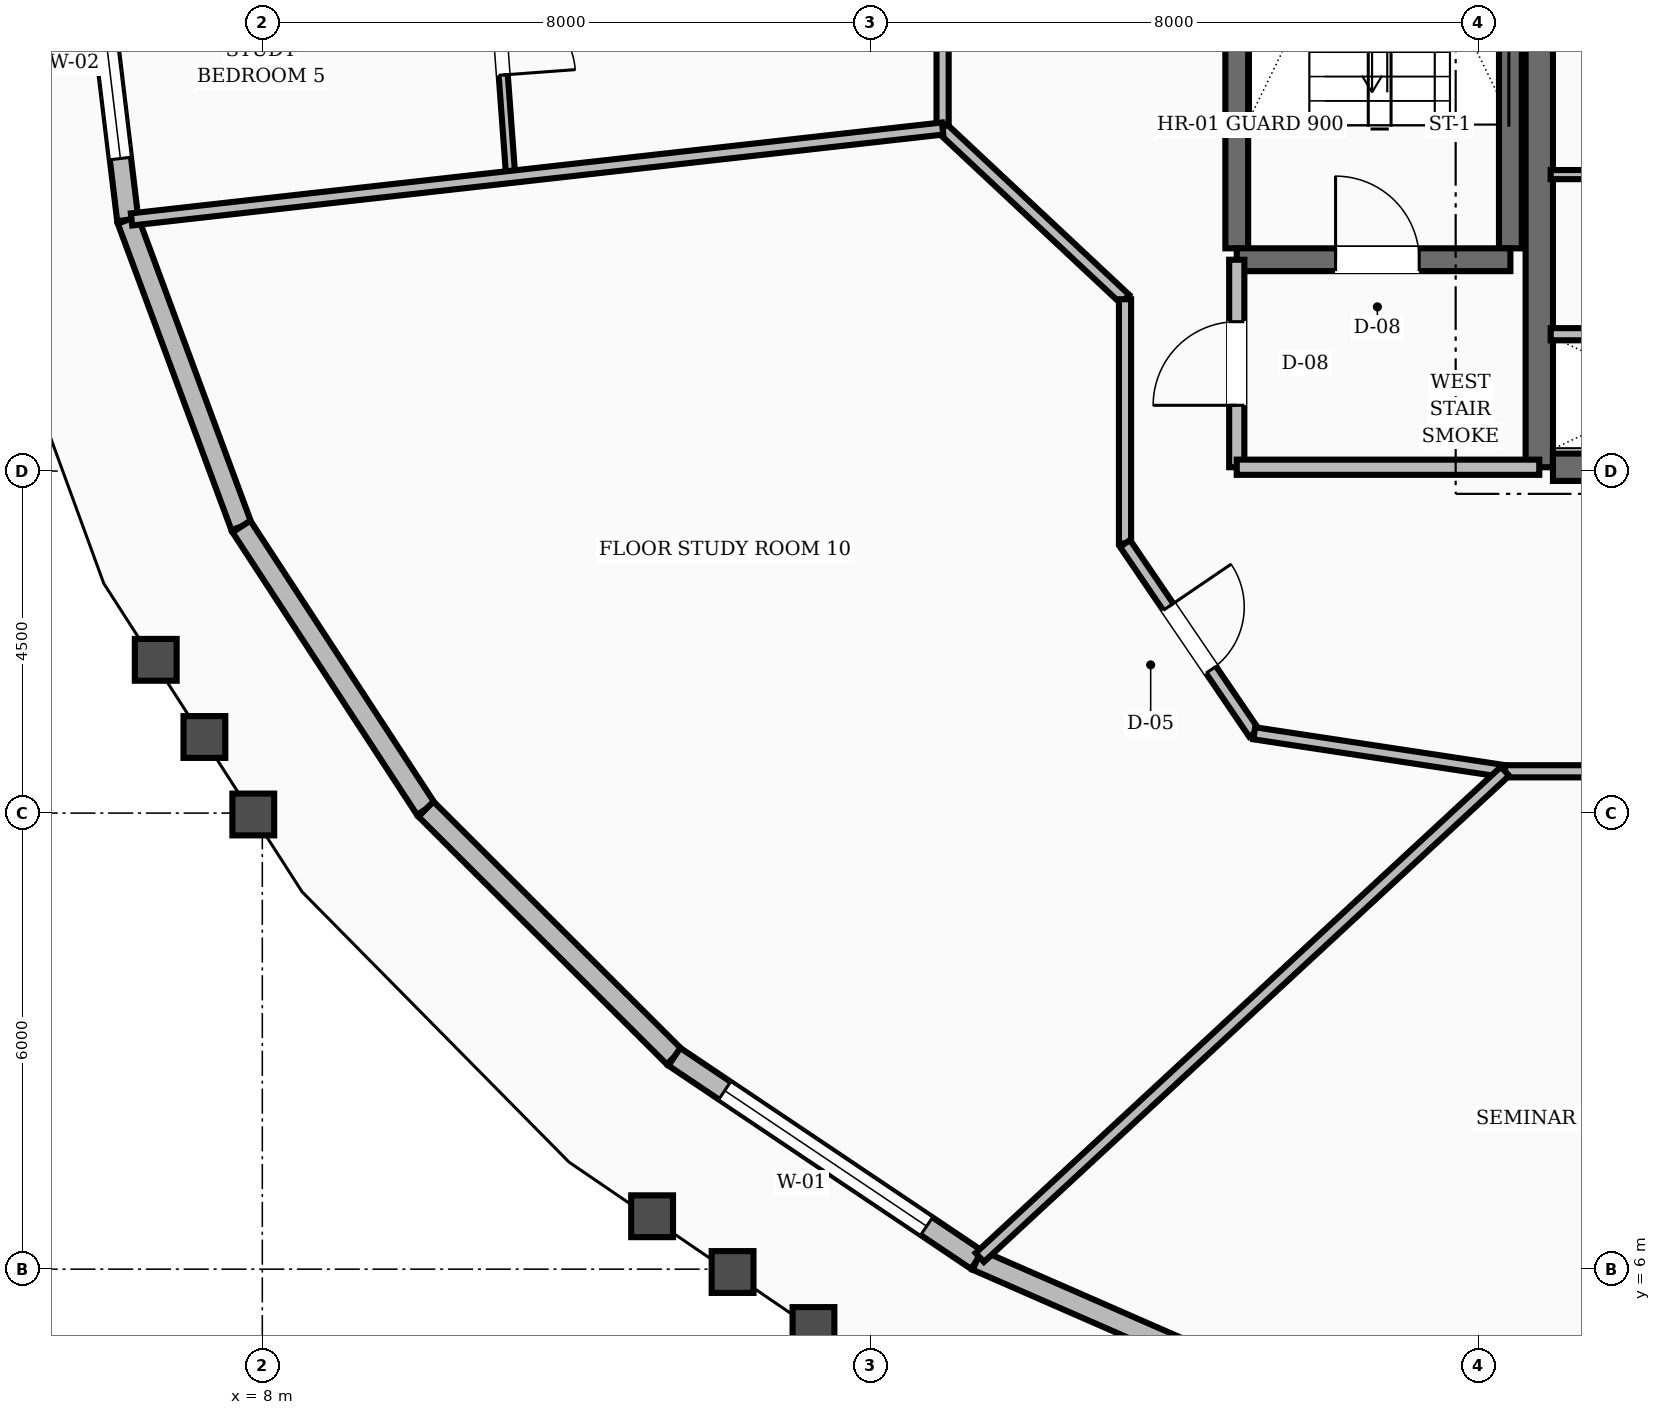
"""IFC4 building model, lengths in metres.
Left out: names, types, materials, properties, quantities, classifications, styles, units other than length and angle.
Written with IfcOpenShell. Run it as: python <this file> out.ifc"""

import sys

from ifc_helpers import new_model, si_unit, direction, frame, frame_2d, origin, place, context, subcontext, project, spatial, rectangle, extrude, element, fill, save


model = new_model("IFC4")
c1 = context("Model", 3, precision=1e-05, world=origin(), true_north=direction((0.0, 1.0)))
c2 = subcontext(c1, "Body", "Model", "MODEL_VIEW")
j1 = project(units=[si_unit("LENGTHUNIT", "METRE"), si_unit("PLANEANGLEUNIT", "RADIAN")], contexts=[c1])
p1 = place(None, origin())
s1 = spatial("IfcSite", under=j1, at=p1, CompositionType="ELEMENT")
p2 = place(p1, origin())
s2 = spatial("IfcBuilding", under=s1, at=p2, CompositionType="ELEMENT")
p3 = place(p2, frame((0.0, 0.0, 156.8)))
s3 = spatial("IfcBuildingStorey", under=s2, at=p3, CompositionType="ELEMENT", Elevation=156.8)
p4 = place(p3, frame((24.8, 16.55, 0.0), z_axis=(0.0, 0.0, 1.0), x_axis=(0.0, 1.0, 0.0)))
e1 = element("IfcWall", 1, at=p4, inside=s3, PredefinedType="SHEAR", context=c2, shape_type="SweptSolid", body=[
    extrude(rectangle(XDim=6.3, YDim=0.36, at=frame_2d((3.15, 0.0))), origin(), (0.0, 0.0, 1.0), 3.6),
])
p5 = place(p3, frame((24.98, 16.55, 0.0), z_axis=(0.0, 0.0, 1.0), x_axis=(1.0, 0.0, 0.0)))
e2 = element("IfcWall", 2, at=p5, inside=s3, PredefinedType="SHEAR", context=c2, shape_type="SweptSolid", body=[
    extrude(rectangle(XDim=3.22, YDim=0.36, at=frame_2d((1.61, 0.0))), origin(), (0.0, 0.0, 1.0), 3.6),
])
for number, where, z_axis, x_axis in (
    (3, (20.82, 19.43, 0.0), (0.0, 0.0, 1.0), (0.0, 1.0, 0.0)),
    (4, (24.42, 19.43, 0.0), (0.0, 0.0, 1.0), (0.0, 1.0, 0.0)),
):
    element("IfcWall", number, at=place(p3, frame(where, z_axis=z_axis, x_axis=x_axis)), inside=s3, PredefinedType="SHEAR", context=c2, shape_type="SweptSolid", body=[
        extrude(rectangle(XDim=8.74, YDim=0.3, at=frame_2d((4.37, 0.0))), origin(), (0.0, 0.0, 1.0), 3.6),
    ])
p6 = place(p3, frame((20.82, 19.28, 0.0), z_axis=(0.0, 0.0, 1.0), x_axis=(1.0, 0.0, 0.0)))
e5 = element("IfcWall", 5, at=p6, inside=s3, PredefinedType="SHEAR", context=c2, shape_type="SweptSolid", body=[
    extrude(rectangle(XDim=3.6, YDim=0.3, at=frame_2d((1.8, 0.0))), origin(), (0.0, 0.0, 1.0), 3.6),
])
p7 = place(p6, frame((1.3, 0.0, 0.0)))
e6 = element("IfcOpeningElement", 6, at=p7, cuts=e5, PredefinedType="OPENING", context=c2, shape_type="SweptSolid", body=[
    extrude(rectangle(XDim=1.1, YDim=2.1, at=frame_2d((0.55, 1.05))), frame((0.0, 0.16, 0.0), z_axis=(0.0, -1.0, 0.0), x_axis=(1.0, 0.0, 0.0)), (0.0, 0.0, 1.0), 0.32),
])
p8 = place(p3, frame((5.725, 24.0, 0.0), z_axis=(0.0, 0.0, 1.0), x_axis=(0.119482396894, -0.992836319255, 0.0)))
e7 = element("IfcWall", 7, at=p8, inside=s3, PredefinedType="STANDARD", context=c2, shape_type="SweptSolid", body=[
    extrude(rectangle(XDim=4.226, YDim=0.28, at=frame_2d((2.113, 0.0))), origin(), (0.0, 0.0, 1.0), 2.82),
])
p9 = place(p8, frame((0.813, 0.0, 0.8)))
e8 = element("IfcOpeningElement", 8, at=p9, cuts=e7, PredefinedType="OPENING", context=c2, shape_type="SweptSolid", body=[
    extrude(rectangle(XDim=2.6, YDim=1.65, at=frame_2d((1.3, 0.825))), frame((0.0, 0.15, 0.0), z_axis=(0.0, -1.0, 0.0), x_axis=(1.0, 0.0, 0.0)), (0.0, 0.0, 1.0), 0.3),
])
p10 = place(p3, frame((6.23, 19.805, 0.0), z_axis=(0.0, 0.0, 1.0), x_axis=(0.347513952329, -0.937674811935, 0.0)))
e9 = element("IfcWall", 9, at=p10, inside=s3, PredefinedType="STANDARD", context=c2, shape_type="SweptSolid", body=[
    extrude(rectangle(XDim=4.302, YDim=0.28, at=frame_2d((2.151, 0.0))), origin(), (0.0, 0.0, 1.0), 2.82),
])
p11 = place(p3, frame((7.725, 15.771, 0.0), z_axis=(0.0, 0.0, 1.0), x_axis=(0.546834521775, -0.83724070959, 0.0)))
e10 = element("IfcWall", 10, at=p11, inside=s3, PredefinedType="STANDARD", context=c2, shape_type="SweptSolid", body=[
    extrude(rectangle(XDim=4.44, YDim=0.28, at=frame_2d((2.22, 0.0))), origin(), (0.0, 0.0, 1.0), 2.82),
])
p12 = place(p3, frame((10.153, 12.053, 0.0), z_axis=(0.0, 0.0, 1.0), x_axis=(0.708084852303, -0.706127355326, 0.0)))
e11 = element("IfcWall", 11, at=p12, inside=s3, PredefinedType="STANDARD", context=c2, shape_type="SweptSolid", body=[
    extrude(rectangle(XDim=4.615, YDim=0.28, at=frame_2d((2.307, 0.0))), origin(), (0.0, 0.0, 1.0), 2.82),
])
p13 = place(p3, frame((13.421, 8.794, 0.0), z_axis=(0.0, 0.0, 1.0), x_axis=(0.830095249601, -0.557621624931, 0.0)))
e12 = element("IfcWall", 12, at=p13, inside=s3, PredefinedType="STANDARD", context=c2, shape_type="SweptSolid", body=[
    extrude(rectangle(XDim=4.796, YDim=0.28, at=frame_2d((2.398, 0.0))), origin(), (0.0, 0.0, 1.0), 2.82),
])
p14 = place(p13, frame((0.798, 0.0, 0.8)))
e13 = element("IfcOpeningElement", 13, at=p14, cuts=e12, PredefinedType="OPENING", context=c2, shape_type="SweptSolid", body=[
    extrude(rectangle(XDim=3.2, YDim=1.65, at=frame_2d((1.6, 0.825))), frame((0.0, 0.15, 0.0), z_axis=(0.0, -1.0, 0.0), x_axis=(1.0, 0.0, 0.0)), (0.0, 0.0, 1.0), 0.3),
])
p15 = place(p3, frame((17.402, 6.12, 0.0), z_axis=(0.0, 0.0, 1.0), x_axis=(0.916185584373, -0.400754257603, 0.0)))
e14 = element("IfcWall", 14, at=p15, inside=s3, PredefinedType="STANDARD", context=c2, shape_type="SweptSolid", body=[
    extrude(rectangle(XDim=4.958, YDim=0.28, at=frame_2d((2.479, 0.0))), origin(), (0.0, 0.0, 1.0), 2.82),
])
p16 = place(p3, frame((20.82, 16.55, 0.0), z_axis=(0.0, 0.0, 1.0), x_axis=(0.0, 1.0, 0.0)))
e15 = element("IfcWall", 15, at=p16, inside=s3, PredefinedType="SOLIDWALL", context=c2, shape_type="SweptSolid", body=[
    extrude(rectangle(XDim=2.73, YDim=0.2, at=frame_2d((1.365, 0.0))), origin(), (0.0, 0.0, 1.0), 2.8),
])
p17 = place(p16, frame((0.815, 0.0, 0.0)))
e16 = element("IfcOpeningElement", 16, at=p17, cuts=e15, PredefinedType="OPENING", context=c2, shape_type="SweptSolid", body=[
    extrude(rectangle(XDim=1.1, YDim=2.1, at=frame_2d((0.55, 1.05))), frame((0.0, 0.11, 0.0), z_axis=(0.0, -1.0, 0.0), x_axis=(1.0, 0.0, 0.0)), (0.0, 0.0, 1.0), 0.22),
])
p18 = place(p3, frame((20.82, 16.55, 0.0), z_axis=(0.0, 0.0, 1.0), x_axis=(1.0, 0.0, 0.0)))
e17 = element("IfcWall", 17, at=p18, inside=s3, PredefinedType="SOLIDWALL", context=c2, shape_type="SweptSolid", body=[
    extrude(rectangle(XDim=3.98, YDim=0.2, at=frame_2d((1.99, 0.0))), origin(), (0.0, 0.0, 1.0), 2.8),
])
p19 = place(p3, frame((24.95, 18.3, 0.0), z_axis=(0.0, 0.0, 1.0), x_axis=(1.0, 0.0, 0.0)))
e18 = element("IfcWall", 18, at=p19, inside=s3, PredefinedType="SOLIDWALL", context=c2, shape_type="SweptSolid", body=[
    extrude(rectangle(XDim=3.2, YDim=0.16, at=frame_2d((1.6, 0.0))), origin(), (0.0, 0.0, 1.0), 2.8),
])
p20 = place(p3, frame((24.95, 20.4, 0.0), z_axis=(0.0, 0.0, 1.0), x_axis=(1.0, 0.0, 0.0)))
e19 = element("IfcWall", 19, at=p20, inside=s3, PredefinedType="PARTITIONING", context=c2, shape_type="SweptSolid", body=[
    extrude(rectangle(XDim=3.2, YDim=0.12, at=frame_2d((1.6, 0.0))), origin(), (0.0, 0.0, 1.0), 2.8),
])
p21 = place(p20, frame((1.125, 0.0, 0.0)))
e20 = element("IfcOpeningElement", 20, at=p21, cuts=e19, PredefinedType="OPENING", context=c2, shape_type="SweptSolid", body=[
    extrude(rectangle(XDim=0.95, YDim=2.1, at=frame_2d((0.475, 1.05))), frame((0.0, 0.07, 0.0), z_axis=(0.0, -1.0, 0.0), x_axis=(1.0, 0.0, 0.0)), (0.0, 0.0, 1.0), 0.14),
])
p22 = place(p3, frame((16.95, 24.0, 0.0), z_axis=(0.0, 0.0, 1.0), x_axis=(0.0, -1.0, 0.0)))
e21 = element("IfcWall", 21, at=p22, inside=s3, PredefinedType="SOLIDWALL", context=c2, shape_type="SweptSolid", body=[
    extrude(rectangle(XDim=2.994, YDim=0.16, at=frame_2d((1.497, 0.0))), origin(), (0.0, 0.0, 1.0), 2.8),
])
p23 = place(p3, frame((16.95, 21.006, 0.0), z_axis=(0.0, 0.0, 1.0), x_axis=(0.730150682073, -0.683286163674, 0.0)))
e22 = element("IfcWall", 22, at=p23, inside=s3, PredefinedType="SOLIDWALL", context=c2, shape_type="SweptSolid", body=[
    extrude(rectangle(XDim=3.287, YDim=0.16, at=frame_2d((1.644, 0.0))), origin(), (0.0, 0.0, 1.0), 2.8),
])
p24 = place(p3, frame((19.35, 18.76, 0.0), z_axis=(0.0, 0.0, 1.0), x_axis=(0.0, -1.0, 0.0)))
e23 = element("IfcWall", 23, at=p24, inside=s3, PredefinedType="SOLIDWALL", context=c2, shape_type="SweptSolid", body=[
    extrude(rectangle(XDim=3.213, YDim=0.16, at=frame_2d((1.606, 0.0))), origin(), (0.0, 0.0, 1.0), 2.8),
])
p25 = place(p3, frame((19.35, 15.548, 0.0), z_axis=(0.0, 0.0, 1.0), x_axis=(0.562674669208, -0.826678423955, 0.0)))
e24 = element("IfcWall", 24, at=p25, inside=s3, PredefinedType="SOLIDWALL", context=c2, shape_type="SweptSolid", body=[
    extrude(rectangle(XDim=3.021, YDim=0.16, at=frame_2d((1.511, 0.0))), origin(), (0.0, 0.0, 1.0), 2.8),
])
p26 = place(p25, frame((1.01, 0.0, 0.0)))
e25 = element("IfcOpeningElement", 25, at=p26, cuts=e24, PredefinedType="OPENING", context=c2, shape_type="SweptSolid", body=[
    extrude(rectangle(XDim=1.0, YDim=2.1, at=frame_2d((0.5, 1.05))), frame((0.0, 0.09, 0.0), z_axis=(0.0, -1.0, 0.0), x_axis=(1.0, 0.0, 0.0)), (0.0, 0.0, 1.0), 0.18),
])
p27 = place(p3, frame((21.05, 13.05, 0.0), z_axis=(0.0, 0.0, 1.0), x_axis=(0.988710906508, -0.149835721217, 0.0)))
e26 = element("IfcWall", 26, at=p27, inside=s3, PredefinedType="SOLIDWALL", context=c2, shape_type="SweptSolid", body=[
    extrude(rectangle(XDim=3.337, YDim=0.16, at=frame_2d((1.668, 0.0))), origin(), (0.0, 0.0, 1.0), 2.8),
])
p28 = place(p3, frame((24.349, 12.55, 0.0), z_axis=(0.0, 0.0, 1.0), x_axis=(1.0, 0.0, 0.0)))
e27 = element("IfcWall", 27, at=p28, inside=s3, PredefinedType="SOLIDWALL", context=c2, shape_type="SweptSolid", body=[
    extrude(rectangle(XDim=2.908, YDim=0.16, at=frame_2d((1.454, 0.0))), origin(), (0.0, 0.0, 1.0), 2.8),
])
p29 = place(p3, frame((11.001, 24.0, 0.0), z_axis=(0.0, 0.0, 1.0), x_axis=(0.073501140862, -0.997295132993, 0.0)))
e28 = element("IfcWall", 28, at=p29, inside=s3, PredefinedType="PARTITIONING", context=c2, shape_type="SweptSolid", body=[
    extrude(rectangle(XDim=3.64, YDim=0.12, at=frame_2d((1.82, 0.0))), origin(), (0.0, 0.0, 1.0), 2.8),
])
p30 = place(p29, frame((1.345, 0.0, 0.0)))
e29 = element("IfcOpeningElement", 29, at=p30, cuts=e28, PredefinedType="OPENING", context=c2, shape_type="SweptSolid", body=[
    extrude(rectangle(XDim=0.95, YDim=2.1, at=frame_2d((0.475, 1.05))), frame((0.0, 0.07, 0.0), z_axis=(0.0, -1.0, 0.0), x_axis=(1.0, 0.0, 0.0)), (0.0, 0.0, 1.0), 0.14),
])
p31 = place(p3, frame((16.95, 21.006, 0.0), z_axis=(0.0, 0.0, 1.0), x_axis=(-0.993776231557, -0.111394800558, 0.0)))
e30 = element("IfcWall", 30, at=p31, inside=s3, PredefinedType="SOLIDWALL", context=c2, shape_type="SweptSolid", body=[
    extrude(rectangle(XDim=10.737, YDim=0.16, at=frame_2d((5.369, 0.0))), origin(), (0.0, 0.0, 1.0), 2.8),
])
p32 = place(p3, frame((24.349, 12.55, 0.0), z_axis=(0.0, 0.0, 1.0), x_axis=(-0.733869336749, -0.679290656921, 0.0)))
e31 = element("IfcWall", 31, at=p32, inside=s3, PredefinedType="SOLIDWALL", context=c2, shape_type="SweptSolid", body=[
    extrude(rectangle(XDim=9.416, YDim=0.16, at=frame_2d((4.708, 0.0))), origin(), (0.0, 0.0, 1.0), 2.8),
])
p33 = place(p9, origin())
e32 = element("IfcWindow", 32, at=p33, inside=s3, PartitioningType="SINGLE_PANEL", PredefinedType="WINDOW", context=c2, shape_type="SweptSolid", body=[
    extrude(rectangle(XDim=2.6, YDim=1.65, at=frame_2d((1.3, 0.825))), frame((0.0, 0.03, 0.0), z_axis=(0.0, -1.0, 0.0), x_axis=(1.0, 0.0, 0.0)), (0.0, 0.0, 1.0), 0.06),
])
fill(e8, e32)
p34 = place(p14, origin())
e33 = element("IfcWindow", 33, at=p34, inside=s3, PartitioningType="SINGLE_PANEL", PredefinedType="WINDOW", context=c2, shape_type="SweptSolid", body=[
    extrude(rectangle(XDim=3.2, YDim=1.65, at=frame_2d((1.6, 0.825))), frame((0.0, 0.03, 0.0), z_axis=(0.0, -1.0, 0.0), x_axis=(1.0, 0.0, 0.0)), (0.0, 0.0, 1.0), 0.06),
])
fill(e13, e33)
p35 = place(p7, origin())
e34 = element("IfcDoor", 34, at=p35, inside=s3, OperationType="SINGLE_SWING_LEFT", PredefinedType="DOOR", context=c2, shape_type="SweptSolid", body=[
    extrude(rectangle(XDim=1.1, YDim=2.1, at=frame_2d((0.55, 1.05))), frame((0.0, 0.025, 0.0), z_axis=(0.0, -1.0, 0.0), x_axis=(1.0, 0.0, 0.0)), (0.0, 0.0, 1.0), 0.05),
])
fill(e6, e34)
p36 = place(p17, origin())
e35 = element("IfcDoor", 35, at=p36, inside=s3, OperationType="SINGLE_SWING_LEFT", PredefinedType="DOOR", context=c2, shape_type="SweptSolid", body=[
    extrude(rectangle(XDim=1.1, YDim=2.1, at=frame_2d((0.55, 1.05))), frame((0.0, 0.025, 0.0), z_axis=(0.0, -1.0, 0.0), x_axis=(1.0, 0.0, 0.0)), (0.0, 0.0, 1.0), 0.05),
])
fill(e16, e35)
p37 = place(p30, origin())
e36 = element("IfcDoor", 36, at=p37, inside=s3, OperationType="SINGLE_SWING_RIGHT", PredefinedType="DOOR", context=c2, shape_type="SweptSolid", body=[
    extrude(rectangle(XDim=0.95, YDim=2.1, at=frame_2d((0.475, 1.05))), frame((0.0, 0.025, 0.0), z_axis=(0.0, -1.0, 0.0), x_axis=(1.0, 0.0, 0.0)), (0.0, 0.0, 1.0), 0.05),
])
fill(e29, e36)
p38 = place(p26, origin())
e37 = element("IfcDoor", 37, at=p38, inside=s3, OperationType="SINGLE_SWING_LEFT", PredefinedType="DOOR", context=c2, shape_type="SweptSolid", body=[
    extrude(rectangle(XDim=1.0, YDim=2.1, at=frame_2d((0.5, 1.05))), frame((0.0, 0.025, 0.0), z_axis=(0.0, -1.0, 0.0), x_axis=(1.0, 0.0, 0.0)), (0.0, 0.0, 1.0), 0.05),
])
fill(e25, e37)
save(model, sys.argv[1])
